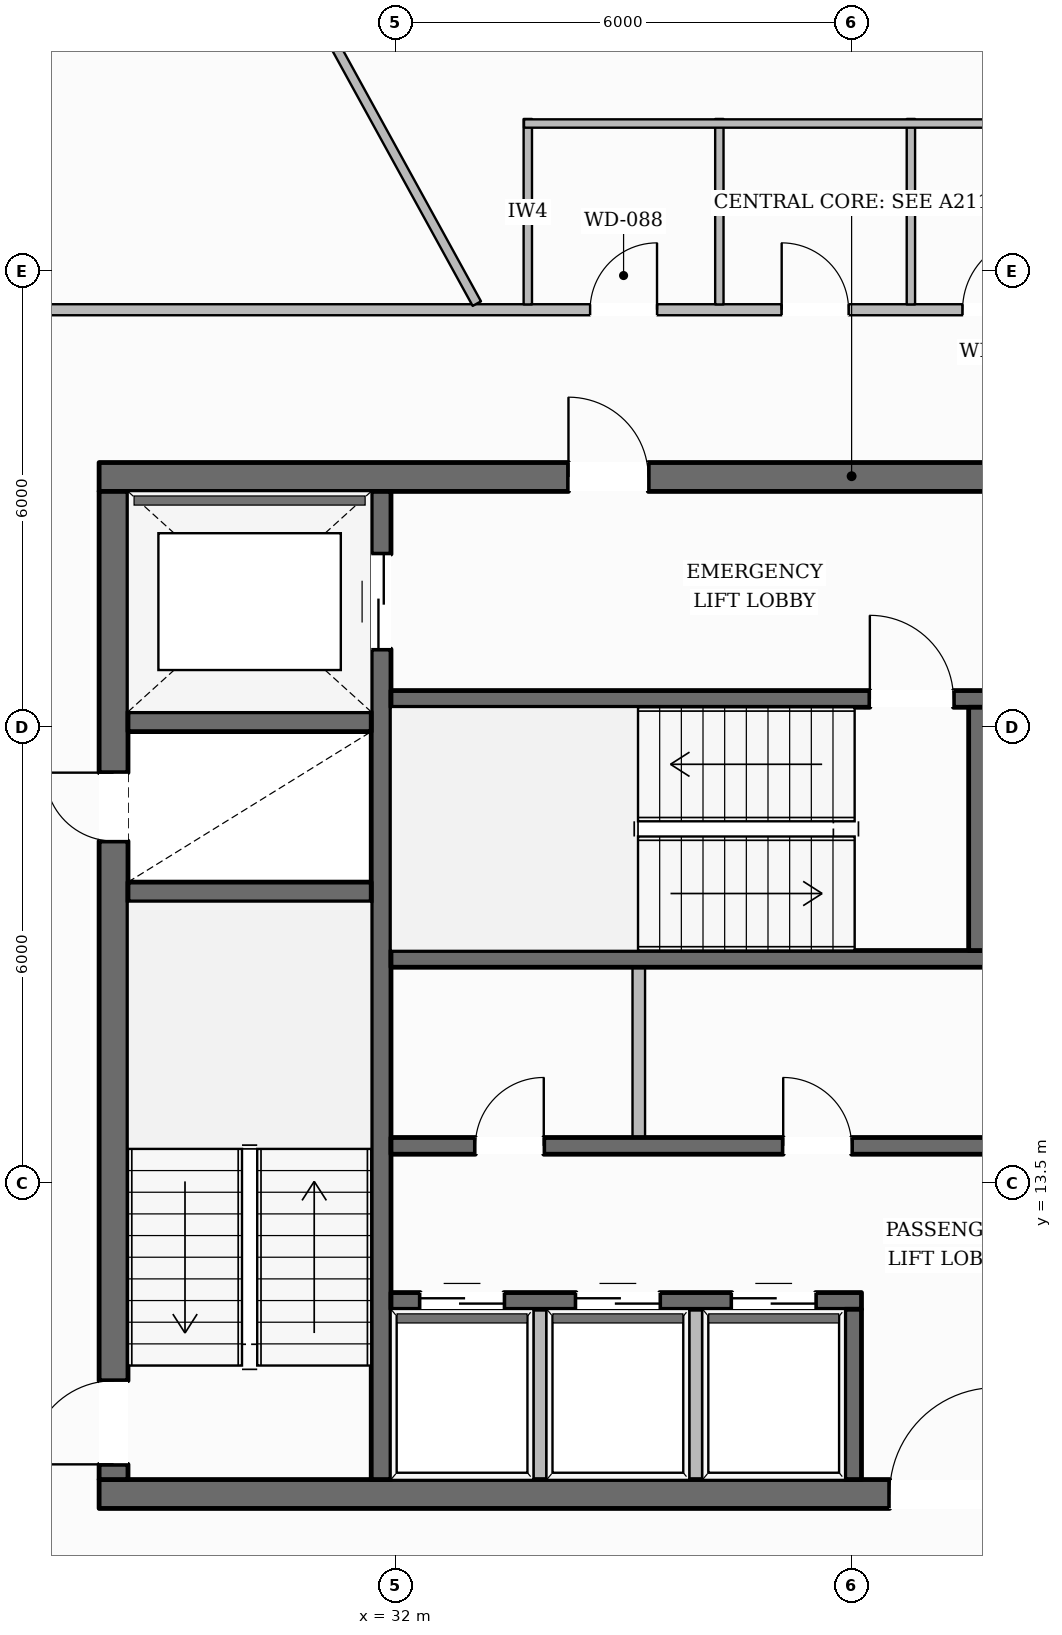
"""IFC4 building model, lengths in metres.
Left out: names, types, materials, properties, quantities, classifications, styles, units other than length and angle.
Written with IfcOpenShell. Run it as: python <this file> out.ifc"""

import sys

from ifc_helpers import new_model, si_unit, direction, frame, frame_2d, origin, place, context, subcontext, project, spatial, rectangle, extrude, element, fill, save


model = new_model("IFC4")
c1 = context("Model", 3, precision=1e-05, world=origin(), true_north=direction((0.0, 1.0)))
c2 = subcontext(c1, "Body", "Model", "MODEL_VIEW")
j1 = project(units=[si_unit("LENGTHUNIT", "METRE"), si_unit("PLANEANGLEUNIT", "RADIAN")], contexts=[c1])
p1 = place(None, origin())
s1 = spatial("IfcSite", under=j1, at=p1, CompositionType="ELEMENT")
p2 = place(p1, origin())
s2 = spatial("IfcBuilding", under=s1, at=p2, CompositionType="ELEMENT")
p3 = place(p2, frame((0.0, 0.0, 243.35)))
s3 = spatial("IfcBuildingStorey", under=s2, at=p3, CompositionType="ELEMENT", Elevation=243.35)
p4 = place(p3, frame((28.1, 9.41, 0.0), z_axis=(0.0, 0.0, 1.0), x_axis=(1.0, 0.0, 0.0)))
e1 = element("IfcWall", 1, at=p4, inside=s3, PredefinedType="SOLIDWALL", context=c2, shape_type="SweptSolid", body=[
    extrude(rectangle(XDim=19.8, YDim=0.38, at=frame_2d((9.9, 0.0))), origin(), (0.0, 0.0, 1.0), 3.61),
])
p5 = place(p4, frame((10.4, 0.0, 0.0)))
e2 = element("IfcOpeningElement", 2, at=p5, cuts=e1, PredefinedType="OPENING", context=c2, shape_type="SweptSolid", body=[
    extrude(rectangle(XDim=1.4, YDim=2.2, at=frame_2d((0.7, 1.1))), frame((0.0, 0.2, 0.0), z_axis=(0.0, -1.0, 0.0), x_axis=(1.0, 0.0, 0.0)), (0.0, 0.0, 1.0), 0.4),
])
p6 = place(p3, frame((28.1, 22.79, 0.0), z_axis=(0.0, 0.0, 1.0), x_axis=(1.0, 0.0, 0.0)))
e3 = element("IfcWall", 3, at=p6, inside=s3, PredefinedType="SOLIDWALL", context=c2, shape_type="SweptSolid", body=[
    extrude(rectangle(XDim=19.8, YDim=0.38, at=frame_2d((9.9, 0.0))), origin(), (0.0, 0.0, 1.0), 3.61),
])
p7 = place(p6, frame((6.175, 0.0, 0.0)))
e4 = element("IfcOpeningElement", 4, at=p7, cuts=e3, PredefinedType="OPENING", context=c2, shape_type="SweptSolid", body=[
    extrude(rectangle(XDim=1.05, YDim=2.15, at=frame_2d((0.525, 1.075))), frame((0.0, 0.2, 0.0), z_axis=(0.0, -1.0, 0.0), x_axis=(1.0, 0.0, 0.0)), (0.0, 0.0, 1.0), 0.4),
])
p8 = place(p6, frame((12.575, 0.0, 0.0)))
e5 = element("IfcOpeningElement", 5, at=p8, cuts=e3, PredefinedType="OPENING", context=c2, shape_type="SweptSolid", body=[
    extrude(rectangle(XDim=1.05, YDim=2.15, at=frame_2d((0.525, 1.075))), frame((0.0, 0.2, 0.0), z_axis=(0.0, -1.0, 0.0), x_axis=(1.0, 0.0, 0.0)), (0.0, 0.0, 1.0), 0.4),
])
p9 = place(p3, frame((28.29, 9.6, 0.0), z_axis=(0.0, 0.0, 1.0), x_axis=(0.0, 1.0, 0.0)))
e6 = element("IfcWall", 6, at=p9, inside=s3, PredefinedType="SOLIDWALL", context=c2, shape_type="SweptSolid", body=[
    extrude(rectangle(XDim=13.0, YDim=0.38, at=frame_2d((6.5, 0.0))), origin(), (0.0, 0.0, 1.0), 3.61),
])
p10 = place(p9, frame((0.2, 0.0, 0.0)))
e7 = element("IfcOpeningElement", 7, at=p10, cuts=e6, PredefinedType="OPENING", context=c2, shape_type="SweptSolid", body=[
    extrude(rectangle(XDim=1.1, YDim=2.15, at=frame_2d((0.55, 1.075))), frame((0.0, 0.2, 0.0), z_axis=(0.0, -1.0, 0.0), x_axis=(1.0, 0.0, 0.0)), (0.0, 0.0, 1.0), 0.4),
])
p11 = place(p9, frame((8.4, 0.0, 0.0)))
e8 = element("IfcOpeningElement", 8, at=p11, cuts=e6, PredefinedType="OPENING", context=c2, shape_type="SweptSolid", body=[
    extrude(rectangle(XDim=0.9, YDim=2.1, at=frame_2d((0.45, 1.05))), frame((0.0, 0.2, 0.0), z_axis=(0.0, -1.0, 0.0), x_axis=(1.0, 0.0, 0.0)), (0.0, 0.0, 1.0), 0.4),
])
p12 = place(p3, frame((31.81, 9.6, 0.0), z_axis=(0.0, 0.0, 1.0), x_axis=(0.0, 1.0, 0.0)))
e9 = element("IfcWall", 9, at=p12, inside=s3, PredefinedType="SHEAR", context=c2, shape_type="SweptSolid", body=[
    extrude(rectangle(XDim=13.0, YDim=0.26, at=frame_2d((6.5, 0.0))), origin(), (0.0, 0.0, 1.0), 3.61),
])
p13 = place(p12, frame((10.925, 0.0, 0.0)))
e10 = element("IfcOpeningElement", 10, at=p13, cuts=e9, PredefinedType="OPENING", context=c2, shape_type="SweptSolid", body=[
    extrude(rectangle(XDim=1.25, YDim=2.25, at=frame_2d((0.625, 1.125))), frame((0.0, 0.14, 0.0), z_axis=(0.0, -1.0, 0.0), x_axis=(1.0, 0.0, 0.0)), (0.0, 0.0, 1.0), 0.28),
])
for number, where, z_axis, x_axis in (
    (11, (28.48, 17.33, 0.0), (0.0, 0.0, 1.0), (1.0, 0.0, 0.0)),
    (12, (28.48, 19.57, 0.0), (0.0, 0.0, 1.0), (1.0, 0.0, 0.0)),
):
    element("IfcWall", number, at=place(p3, frame(where, z_axis=z_axis, x_axis=x_axis)), inside=s3, PredefinedType="SHEAR", context=c2, shape_type="SweptSolid", body=[
        extrude(rectangle(XDim=3.2, YDim=0.26, at=frame_2d((1.6, 0.0))), origin(), (0.0, 0.0, 1.0), 3.61),
    ])
p14 = place(p3, frame((31.94, 19.87, 0.0), z_axis=(0.0, 0.0, 1.0), x_axis=(1.0, 0.0, 0.0)))
e13 = element("IfcWall", 13, at=p14, inside=s3, PredefinedType="SOLIDWALL", context=c2, shape_type="SweptSolid", body=[
    extrude(rectangle(XDim=12.12, YDim=0.22, at=frame_2d((6.06, 0.0))), origin(), (0.0, 0.0, 1.0), 3.61),
])
p15 = place(p14, frame((6.3, 0.0, 0.0)))
e14 = element("IfcOpeningElement", 14, at=p15, cuts=e13, PredefinedType="OPENING", context=c2, shape_type="SweptSolid", body=[
    extrude(rectangle(XDim=1.1, YDim=2.15, at=frame_2d((0.55, 1.075))), frame((0.0, 0.12, 0.0), z_axis=(0.0, -1.0, 0.0), x_axis=(1.0, 0.0, 0.0)), (0.0, 0.0, 1.0), 0.24),
])
p16 = place(p14, frame((8.61, 0.0, 0.0)))
e15 = element("IfcOpeningElement", 15, at=p16, cuts=e13, PredefinedType="OPENING", context=c2, shape_type="SweptSolid", body=[
    extrude(rectangle(XDim=0.9, YDim=2.1, at=frame_2d((0.45, 1.05))), frame((0.0, 0.12, 0.0), z_axis=(0.0, -1.0, 0.0), x_axis=(1.0, 0.0, 0.0)), (0.0, 0.0, 1.0), 0.24),
])
p17 = place(p14, frame((10.85, 0.0, 0.0)))
e16 = element("IfcOpeningElement", 16, at=p17, cuts=e13, PredefinedType="OPENING", context=c2, shape_type="SweptSolid", body=[
    extrude(rectangle(XDim=0.9, YDim=2.1, at=frame_2d((0.45, 1.05))), frame((0.0, 0.12, 0.0), z_axis=(0.0, -1.0, 0.0), x_axis=(1.0, 0.0, 0.0)), (0.0, 0.0, 1.0), 0.24),
])
p18 = place(p3, frame((31.94, 16.45, 0.0), z_axis=(0.0, 0.0, 1.0), x_axis=(1.0, 0.0, 0.0)))
e17 = element("IfcWall", 17, at=p18, inside=s3, PredefinedType="SOLIDWALL", context=c2, shape_type="SweptSolid", body=[
    extrude(rectangle(XDim=12.12, YDim=0.22, at=frame_2d((6.06, 0.0))), origin(), (0.0, 0.0, 1.0), 3.61),
])
p19 = place(p3, frame((39.65, 16.56, 0.0), z_axis=(0.0, 0.0, 1.0), x_axis=(0.0, 1.0, 0.0)))
e18 = element("IfcWall", 18, at=p19, inside=s3, PredefinedType="SOLIDWALL", context=c2, shape_type="SweptSolid", body=[
    extrude(rectangle(XDim=3.2, YDim=0.22, at=frame_2d((1.6, 0.0))), origin(), (0.0, 0.0, 1.0), 3.61),
])
p20 = place(p3, frame((31.94, 13.99, 0.0), z_axis=(0.0, 0.0, 1.0), x_axis=(1.0, 0.0, 0.0)))
e19 = element("IfcWall", 19, at=p20, inside=s3, PredefinedType="SOLIDWALL", context=c2, shape_type="SweptSolid", body=[
    extrude(rectangle(XDim=12.12, YDim=0.22, at=frame_2d((6.06, 0.0))), origin(), (0.0, 0.0, 1.0), 3.61),
])
p21 = place(p20, frame((1.11, 0.0, 0.0)))
e20 = element("IfcOpeningElement", 20, at=p21, cuts=e19, PredefinedType="OPENING", context=c2, shape_type="SweptSolid", body=[
    extrude(rectangle(XDim=0.9, YDim=2.1, at=frame_2d((0.45, 1.05))), frame((0.0, 0.12, 0.0), z_axis=(0.0, -1.0, 0.0), x_axis=(1.0, 0.0, 0.0)), (0.0, 0.0, 1.0), 0.24),
])
p22 = place(p20, frame((5.16, 0.0, 0.0)))
e21 = element("IfcOpeningElement", 21, at=p22, cuts=e19, PredefinedType="OPENING", context=c2, shape_type="SweptSolid", body=[
    extrude(rectangle(XDim=0.9, YDim=2.1, at=frame_2d((0.45, 1.05))), frame((0.0, 0.12, 0.0), z_axis=(0.0, -1.0, 0.0), x_axis=(1.0, 0.0, 0.0)), (0.0, 0.0, 1.0), 0.24),
])
p23 = place(p20, frame((9.61, 0.0, 0.0)))
e22 = element("IfcOpeningElement", 22, at=p23, cuts=e19, PredefinedType="OPENING", context=c2, shape_type="SweptSolid", body=[
    extrude(rectangle(XDim=0.9, YDim=2.1, at=frame_2d((0.45, 1.05))), frame((0.0, 0.12, 0.0), z_axis=(0.0, -1.0, 0.0), x_axis=(1.0, 0.0, 0.0)), (0.0, 0.0, 1.0), 0.24),
])
p24 = place(p3, frame((31.94, 11.95, 0.0), z_axis=(0.0, 0.0, 1.0), x_axis=(1.0, 0.0, 0.0)))
e23 = element("IfcWall", 23, at=p24, inside=s3, PredefinedType="SOLIDWALL", context=c2, shape_type="SweptSolid", body=[
    extrude(rectangle(XDim=6.19, YDim=0.22, at=frame_2d((3.095, 0.0))), origin(), (0.0, 0.0, 1.0), 3.61),
])
p25 = place(p24, frame((0.385, 0.0, 0.0)))
e24 = element("IfcOpeningElement", 24, at=p25, cuts=e23, PredefinedType="OPENING", context=c2, shape_type="SweptSolid", body=[
    extrude(rectangle(XDim=1.1, YDim=2.2, at=frame_2d((0.55, 1.1))), frame((0.0, 0.12, 0.0), z_axis=(0.0, -1.0, 0.0), x_axis=(1.0, 0.0, 0.0)), (0.0, 0.0, 1.0), 0.24),
])
p26 = place(p24, frame((2.435, 0.0, 0.0)))
e25 = element("IfcOpeningElement", 25, at=p26, cuts=e23, PredefinedType="OPENING", context=c2, shape_type="SweptSolid", body=[
    extrude(rectangle(XDim=1.1, YDim=2.2, at=frame_2d((0.55, 1.1))), frame((0.0, 0.12, 0.0), z_axis=(0.0, -1.0, 0.0), x_axis=(1.0, 0.0, 0.0)), (0.0, 0.0, 1.0), 0.24),
])
p27 = place(p24, frame((4.485, 0.0, 0.0)))
e26 = element("IfcOpeningElement", 26, at=p27, cuts=e23, PredefinedType="OPENING", context=c2, shape_type="SweptSolid", body=[
    extrude(rectangle(XDim=1.1, YDim=2.2, at=frame_2d((0.55, 1.1))), frame((0.0, 0.12, 0.0), z_axis=(0.0, -1.0, 0.0), x_axis=(1.0, 0.0, 0.0)), (0.0, 0.0, 1.0), 0.24),
])
p28 = place(p3, frame((38.02, 9.6, 0.0), z_axis=(0.0, 0.0, 1.0), x_axis=(0.0, 1.0, 0.0)))
e27 = element("IfcWall", 27, at=p28, inside=s3, PredefinedType="SOLIDWALL", context=c2, shape_type="SweptSolid", body=[
    extrude(rectangle(XDim=2.24, YDim=0.22, at=frame_2d((1.12, 0.0))), origin(), (0.0, 0.0, 1.0), 3.61),
])
p29 = place(p3, frame((16.275, 11.379, 0.0), z_axis=(0.0, 0.0, 1.0), x_axis=(0.490746172412, 0.871302584791, 0.0)))
e28 = element("IfcWall", 28, at=p29, inside=s3, PredefinedType="STANDARD", context=c2, shape_type="SweptSolid", body=[
    extrude(rectangle(XDim=37.617, YDim=0.35, at=frame_2d((18.809, 0.0))), origin(), (0.0, 0.0, 1.0), 3.196),
])
p30 = place(p29, frame((33.404, 0.0, 0.65)))
e29 = element("IfcOpeningElement", 29, at=p30, cuts=e28, PredefinedType="OPENING", context=c2, shape_type="SweptSolid", body=[
    extrude(rectangle(XDim=1.35, YDim=1.75, at=frame_2d((0.675, 0.875))), frame((0.0, 0.185, 0.0), z_axis=(0.0, -1.0, 0.0), x_axis=(1.0, 0.0, 0.0)), (0.0, 0.0, 1.0), 0.37),
])
p31 = place(p29, frame((27.294, 0.0, 0.65)))
e30 = element("IfcOpeningElement", 30, at=p31, cuts=e28, PredefinedType="OPENING", context=c2, shape_type="SweptSolid", body=[
    extrude(rectangle(XDim=1.35, YDim=1.75, at=frame_2d((0.675, 0.875))), frame((0.0, 0.185, 0.0), z_axis=(0.0, -1.0, 0.0), x_axis=(1.0, 0.0, 0.0)), (0.0, 0.0, 1.0), 0.37),
])
p32 = place(p29, frame((15.073, 0.0, 0.65)))
e31 = element("IfcOpeningElement", 31, at=p32, cuts=e28, PredefinedType="OPENING", context=c2, shape_type="SweptSolid", body=[
    extrude(rectangle(XDim=1.35, YDim=1.75, at=frame_2d((0.675, 0.875))), frame((0.0, 0.185, 0.0), z_axis=(0.0, -1.0, 0.0), x_axis=(1.0, 0.0, 0.0)), (0.0, 0.0, 1.0), 0.37),
])
p33 = place(p29, frame((8.963, 0.0, 0.65)))
e32 = element("IfcOpeningElement", 32, at=p33, cuts=e28, PredefinedType="OPENING", context=c2, shape_type="SweptSolid", body=[
    extrude(rectangle(XDim=1.35, YDim=1.75, at=frame_2d((0.675, 0.875))), frame((0.0, 0.185, 0.0), z_axis=(0.0, -1.0, 0.0), x_axis=(1.0, 0.0, 0.0)), (0.0, 0.0, 1.0), 0.37),
])
p34 = place(p29, frame((2.853, 0.0, 0.65)))
e33 = element("IfcOpeningElement", 33, at=p34, cuts=e28, PredefinedType="OPENING", context=c2, shape_type="SweptSolid", body=[
    extrude(rectangle(XDim=1.35, YDim=1.75, at=frame_2d((0.675, 0.875))), frame((0.0, 0.185, 0.0), z_axis=(0.0, -1.0, 0.0), x_axis=(1.0, 0.0, 0.0)), (0.0, 0.0, 1.0), 0.37),
])
for number, where, z_axis, x_axis in (
    (34, (33.9, 9.49, 0.0), (0.0, 0.0, 1.0), (0.0, 1.0, 0.0)),
    (35, (35.95, 9.49, 0.0), (0.0, 0.0, 1.0), (0.0, 1.0, 0.0)),
):
    element("IfcWall", number, at=place(p3, frame(where, z_axis=z_axis, x_axis=x_axis)), inside=s3, PredefinedType="PARTITIONING", context=c2, shape_type="SweptSolid", body=[
        extrude(rectangle(XDim=2.35, YDim=0.165, at=frame_2d((1.175, 0.0))), origin(), (0.0, 0.0, 1.0), 3.61),
    ])
p35 = place(p3, frame((35.2, 14.1, 0.0), z_axis=(0.0, 0.0, 1.0), x_axis=(0.0, 1.0, 0.0)))
e36 = element("IfcWall", 36, at=p35, inside=s3, PredefinedType="PARTITIONING", context=c2, shape_type="SweptSolid", body=[
    extrude(rectangle(XDim=2.24, YDim=0.165, at=frame_2d((1.12, 0.0))), origin(), (0.0, 0.0, 1.0), 3.61),
])
p36 = place(p3, frame((26.09, 24.99, 0.0), z_axis=(0.0, 0.0, 1.0), x_axis=(1.0, 0.0, 0.0)))
e37 = element("IfcWall", 37, at=p36, inside=s3, PredefinedType="PARTITIONING", context=c2, shape_type="SweptSolid", body=[
    extrude(rectangle(XDim=17.11, YDim=0.145, at=frame_2d((8.555, 0.0))), origin(), (0.0, 0.0, 1.0), 3.61),
])
p37 = place(p36, frame((8.47, 0.0, 0.0)))
e38 = element("IfcOpeningElement", 38, at=p37, cuts=e37, PredefinedType="OPENING", context=c2, shape_type="SweptSolid", body=[
    extrude(rectangle(XDim=0.88, YDim=2.1, at=frame_2d((0.44, 1.05))), frame((0.0, 0.083, 0.0), z_axis=(0.0, -1.0, 0.0), x_axis=(1.0, 0.0, 0.0)), (0.0, 0.0, 1.0), 0.165),
])
p38 = place(p36, frame((10.99, 0.0, 0.0)))
e39 = element("IfcOpeningElement", 39, at=p38, cuts=e37, PredefinedType="OPENING", context=c2, shape_type="SweptSolid", body=[
    extrude(rectangle(XDim=0.88, YDim=2.1, at=frame_2d((0.44, 1.05))), frame((0.0, 0.083, 0.0), z_axis=(0.0, -1.0, 0.0), x_axis=(1.0, 0.0, 0.0)), (0.0, 0.0, 1.0), 0.165),
])
p39 = place(p36, frame((13.37, 0.0, 0.0)))
e40 = element("IfcOpeningElement", 40, at=p39, cuts=e37, PredefinedType="OPENING", context=c2, shape_type="SweptSolid", body=[
    extrude(rectangle(XDim=0.96, YDim=2.1, at=frame_2d((0.48, 1.05))), frame((0.0, 0.083, 0.0), z_axis=(0.0, -1.0, 0.0), x_axis=(1.0, 0.0, 0.0)), (0.0, 0.0, 1.0), 0.165),
])
for number, where, z_axis, x_axis in (
    (41, (33.74, 25.06, 0.0), (0.0, 0.0, 1.0), (0.0, 1.0, 0.0)),
    (42, (36.26, 25.06, 0.0), (0.0, 0.0, 1.0), (0.0, 1.0, 0.0)),
    (43, (38.78, 25.06, 0.0), (0.0, 0.0, 1.0), (0.0, 1.0, 0.0)),
):
    element("IfcWall", number, at=place(p3, frame(where, z_axis=z_axis, x_axis=x_axis)), inside=s3, PredefinedType="PLUMBINGWALL", context=c2, shape_type="SweptSolid", body=[
        extrude(rectangle(XDim=2.44, YDim=0.11, at=frame_2d((1.22, 0.0))), origin(), (0.0, 0.0, 1.0), 3.61),
    ])
p40 = place(p3, frame((33.69, 27.44, 0.0), z_axis=(0.0, 0.0, 1.0), x_axis=(1.0, 0.0, 0.0)))
e44 = element("IfcWall", 44, at=p40, inside=s3, PredefinedType="PLUMBINGWALL", context=c2, shape_type="SweptSolid", body=[
    extrude(rectangle(XDim=7.46, YDim=0.11, at=frame_2d((3.73, 0.0))), origin(), (0.0, 0.0, 1.0), 3.61),
])
p41 = place(p3, frame((33.069, 25.071, 0.0), z_axis=(0.0, 0.0, 1.0), x_axis=(-0.481689502038, 0.876341955875, 0.0)))
e45 = element("IfcWall", 45, at=p41, inside=s3, PredefinedType="PARTITIONING", context=c2, shape_type="SweptSolid", body=[
    extrude(rectangle(XDim=8.667, YDim=0.125, at=frame_2d((4.334, 0.0))), origin(), (0.0, 0.0, 1.0), 3.246),
])
p42 = place(p10, origin())
e46 = element("IfcDoor", 46, at=p42, inside=s3, OperationType="SINGLE_SWING_LEFT", PredefinedType="DOOR", context=c2, shape_type="SweptSolid", body=[
    extrude(rectangle(XDim=1.1, YDim=2.15, at=frame_2d((0.55, 1.075))), frame((0.0, 0.025, 0.0), z_axis=(0.0, -1.0, 0.0), x_axis=(1.0, 0.0, 0.0)), (0.0, 0.0, 1.0), 0.05),
])
fill(e7, e46)
p43 = place(p15, origin())
e47 = element("IfcDoor", 47, at=p43, inside=s3, OperationType="SINGLE_SWING_LEFT", PredefinedType="DOOR", context=c2, shape_type="SweptSolid", body=[
    extrude(rectangle(XDim=1.1, YDim=2.15, at=frame_2d((0.55, 1.075))), frame((0.0, 0.025, 0.0), z_axis=(0.0, -1.0, 0.0), x_axis=(1.0, 0.0, 0.0)), (0.0, 0.0, 1.0), 0.05),
])
fill(e14, e47)
p44 = place(p11, origin())
e48 = element("IfcDoor", 48, at=p44, inside=s3, OperationType="SINGLE_SWING_RIGHT", PredefinedType="DOOR", context=c2, shape_type="SweptSolid", body=[
    extrude(rectangle(XDim=0.9, YDim=2.1, at=frame_2d((0.45, 1.05))), frame((0.0, 0.025, 0.0), z_axis=(0.0, -1.0, 0.0), x_axis=(1.0, 0.0, 0.0)), (0.0, 0.0, 1.0), 0.05),
])
fill(e8, e48)
p45 = place(p7, origin())
e49 = element("IfcDoor", 49, at=p45, inside=s3, OperationType="SINGLE_SWING_LEFT", PredefinedType="DOOR", context=c2, shape_type="SweptSolid", body=[
    extrude(rectangle(XDim=1.05, YDim=2.15, at=frame_2d((0.525, 1.075))), frame((0.0, 0.025, 0.0), z_axis=(0.0, -1.0, 0.0), x_axis=(1.0, 0.0, 0.0)), (0.0, 0.0, 1.0), 0.05),
])
fill(e4, e49)
p46 = place(p13, origin())
e50 = element("IfcDoor", 50, at=p46, inside=s3, OperationType="DOUBLE_DOOR_SLIDING", PredefinedType="DOOR", context=c2, shape_type="SweptSolid", body=[
    extrude(rectangle(XDim=1.25, YDim=2.25, at=frame_2d((0.625, 1.125))), frame((0.0, 0.025, 0.0), z_axis=(0.0, -1.0, 0.0), x_axis=(1.0, 0.0, 0.0)), (0.0, 0.0, 1.0), 0.05),
])
fill(e10, e50)
p47 = place(p5, origin())
e51 = element("IfcDoor", 51, at=p47, inside=s3, OperationType="SINGLE_SWING_RIGHT", PredefinedType="DOOR", context=c2, shape_type="SweptSolid", body=[
    extrude(rectangle(XDim=1.4, YDim=2.2, at=frame_2d((0.7, 1.1))), frame((0.0, 0.025, 0.0), z_axis=(0.0, -1.0, 0.0), x_axis=(1.0, 0.0, 0.0)), (0.0, 0.0, 1.0), 0.05),
])
fill(e2, e51)
p48 = place(p25, origin())
e52 = element("IfcDoor", 52, at=p48, inside=s3, OperationType="DOUBLE_DOOR_SLIDING", PredefinedType="DOOR", context=c2, shape_type="SweptSolid", body=[
    extrude(rectangle(XDim=1.1, YDim=2.2, at=frame_2d((0.55, 1.1))), frame((0.0, 0.025, 0.0), z_axis=(0.0, -1.0, 0.0), x_axis=(1.0, 0.0, 0.0)), (0.0, 0.0, 1.0), 0.05),
])
fill(e24, e52)
p49 = place(p26, origin())
e53 = element("IfcDoor", 53, at=p49, inside=s3, OperationType="DOUBLE_DOOR_SLIDING", PredefinedType="DOOR", context=c2, shape_type="SweptSolid", body=[
    extrude(rectangle(XDim=1.1, YDim=2.2, at=frame_2d((0.55, 1.1))), frame((0.0, 0.025, 0.0), z_axis=(0.0, -1.0, 0.0), x_axis=(1.0, 0.0, 0.0)), (0.0, 0.0, 1.0), 0.05),
])
fill(e25, e53)
p50 = place(p27, origin())
e54 = element("IfcDoor", 54, at=p50, inside=s3, OperationType="DOUBLE_DOOR_SLIDING", PredefinedType="DOOR", context=c2, shape_type="SweptSolid", body=[
    extrude(rectangle(XDim=1.1, YDim=2.2, at=frame_2d((0.55, 1.1))), frame((0.0, 0.025, 0.0), z_axis=(0.0, -1.0, 0.0), x_axis=(1.0, 0.0, 0.0)), (0.0, 0.0, 1.0), 0.05),
])
fill(e26, e54)
p51 = place(p21, origin())
e55 = element("IfcDoor", 55, at=p51, inside=s3, OperationType="SINGLE_SWING_RIGHT", PredefinedType="DOOR", context=c2, shape_type="SweptSolid", body=[
    extrude(rectangle(XDim=0.9, YDim=2.1, at=frame_2d((0.45, 1.05))), frame((0.0, 0.025, 0.0), z_axis=(0.0, -1.0, 0.0), x_axis=(1.0, 0.0, 0.0)), (0.0, 0.0, 1.0), 0.05),
])
fill(e20, e55)
p52 = place(p22, origin())
e56 = element("IfcDoor", 56, at=p52, inside=s3, OperationType="SINGLE_SWING_LEFT", PredefinedType="DOOR", context=c2, shape_type="SweptSolid", body=[
    extrude(rectangle(XDim=0.9, YDim=2.1, at=frame_2d((0.45, 1.05))), frame((0.0, 0.025, 0.0), z_axis=(0.0, -1.0, 0.0), x_axis=(1.0, 0.0, 0.0)), (0.0, 0.0, 1.0), 0.05),
])
fill(e21, e56)
p53 = place(p37, origin())
e57 = element("IfcDoor", 57, at=p53, inside=s3, OperationType="SINGLE_SWING_RIGHT", PredefinedType="DOOR", context=c2, shape_type="SweptSolid", body=[
    extrude(rectangle(XDim=0.88, YDim=2.1, at=frame_2d((0.44, 1.05))), frame((0.0, 0.025, 0.0), z_axis=(0.0, -1.0, 0.0), x_axis=(1.0, 0.0, 0.0)), (0.0, 0.0, 1.0), 0.05),
])
fill(e38, e57)
p54 = place(p38, origin())
e58 = element("IfcDoor", 58, at=p54, inside=s3, OperationType="SINGLE_SWING_LEFT", PredefinedType="DOOR", context=c2, shape_type="SweptSolid", body=[
    extrude(rectangle(XDim=0.88, YDim=2.1, at=frame_2d((0.44, 1.05))), frame((0.0, 0.025, 0.0), z_axis=(0.0, -1.0, 0.0), x_axis=(1.0, 0.0, 0.0)), (0.0, 0.0, 1.0), 0.05),
])
fill(e39, e58)
p55 = place(p39, origin())
e59 = element("IfcDoor", 59, at=p55, inside=s3, OperationType="SINGLE_SWING_RIGHT", PredefinedType="DOOR", context=c2, shape_type="SweptSolid", body=[
    extrude(rectangle(XDim=0.96, YDim=2.1, at=frame_2d((0.48, 1.05))), frame((0.0, 0.025, 0.0), z_axis=(0.0, -1.0, 0.0), x_axis=(1.0, 0.0, 0.0)), (0.0, 0.0, 1.0), 0.05),
])
fill(e40, e59)
save(model, sys.argv[1])
